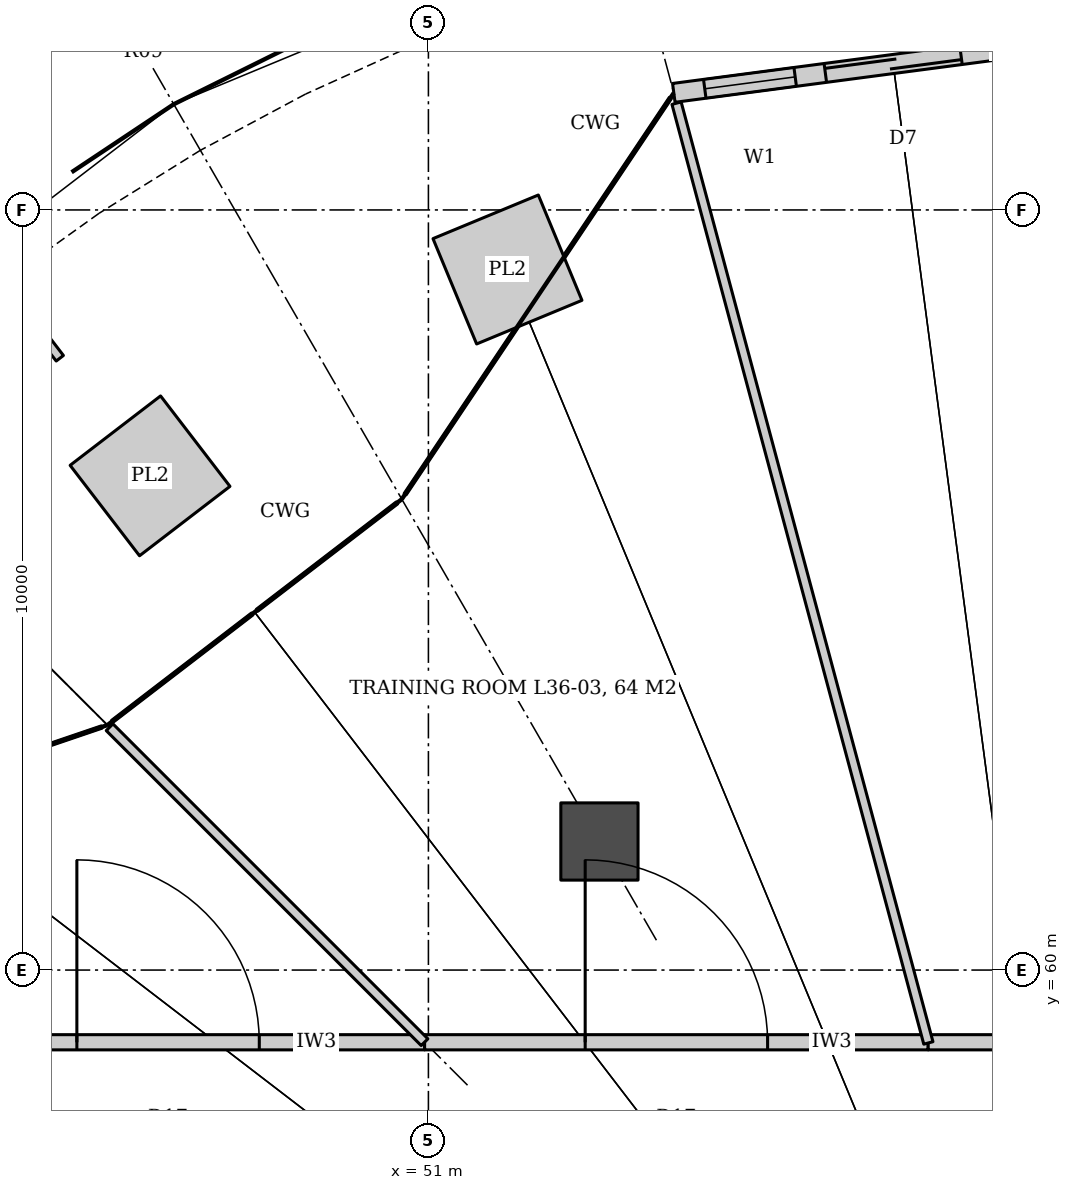
"""IFC4 building model, lengths in metres.
Left out: names, types, materials, properties, quantities, classifications, styles, units other than length and angle.
Written with IfcOpenShell. Run it as: python <this file> out.ifc"""

import sys

from ifc_helpers import new_model, si_unit, direction, frame, frame_2d, origin, origin_2d, place, context, subcontext, project, spatial, rectangle, hollow_circle, extrude, element, fill, save


model = new_model("IFC4")
c1 = context("Model", 3, precision=1e-05, world=origin(), true_north=direction((0.0, 1.0)))
c2 = subcontext(c1, "Body", "Model", "MODEL_VIEW")
j1 = project(units=[si_unit("LENGTHUNIT", "METRE"), si_unit("PLANEANGLEUNIT", "RADIAN")], contexts=[c1])
p1 = place(None, origin())
s1 = spatial("IfcSite", under=j1, at=p1, CompositionType="ELEMENT")
p2 = place(p1, origin())
s2 = spatial("IfcBuilding", under=s1, at=p2, CompositionType="ELEMENT")
p3 = place(p2, frame((0.0, 0.0, 160.4)))
s3 = spatial("IfcBuildingStorey", under=s2, at=p3, CompositionType="ELEMENT", Elevation=160.4)
p4 = place(p3, frame((53.25, 61.691, 0.0), z_axis=(0.0, 0.0, 1.0), x_axis=(1.0, 0.0, 0.0)))
e1 = element("IfcColumn", 1, at=p4, inside=s3, PredefinedType="COLUMN", context=c2, shape_type="SweptSolid", body=[
    extrude(hollow_circle(Radius=0.508, WallThickness=0.05, at=origin_2d()), origin(), (0.0, 0.0, 1.0), 4.2),
])
p5 = place(p3, frame((44.2, 59.05, 0.0), z_axis=(0.0, 0.0, 1.0), x_axis=(1.0, 0.0, 0.0)))
e2 = element("IfcWall", 2, at=p5, inside=s3, PredefinedType="PARTITIONING", context=c2, shape_type="SweptSolid", body=[
    extrude(rectangle(XDim=6.75, YDim=0.2, at=frame_2d((3.375, 0.0))), origin(), (0.0, 0.0, 1.0), 3.012),
])
p6 = place(p5, frame((2.175, 0.0, 0.0)))
e3 = element("IfcOpeningElement", 3, at=p6, cuts=e2, PredefinedType="OPENING", context=c2, shape_type="SweptSolid", body=[
    extrude(rectangle(XDim=2.4, YDim=2.4, at=frame_2d((1.2, 1.2))), frame((0.0, 0.11, 0.0), z_axis=(0.0, -1.0, 0.0), x_axis=(1.0, 0.0, 0.0)), (0.0, 0.0, 1.0), 0.22),
])
p7 = place(p3, frame((50.95, 59.05, 0.0), z_axis=(0.0, 0.0, 1.0), x_axis=(1.0, 0.0, 0.0)))
e4 = element("IfcWall", 4, at=p7, inside=s3, PredefinedType="PARTITIONING", context=c2, shape_type="SweptSolid", body=[
    extrude(rectangle(XDim=6.625, YDim=0.2, at=frame_2d((3.312, 0.0))), origin(), (0.0, 0.0, 1.0), 3.02),
])
p8 = place(p7, frame((2.113, 0.0, 0.0)))
e5 = element("IfcOpeningElement", 5, at=p8, cuts=e4, PredefinedType="OPENING", context=c2, shape_type="SweptSolid", body=[
    extrude(rectangle(XDim=2.4, YDim=2.4, at=frame_2d((1.2, 1.2))), frame((0.0, 0.11, 0.0), z_axis=(0.0, -1.0, 0.0), x_axis=(1.0, 0.0, 0.0)), (0.0, 0.0, 1.0), 0.22),
])
p9 = place(p3, frame((57.575, 59.05, 0.0), z_axis=(0.0, 0.0, 1.0), x_axis=(1.0, 0.0, 0.0)))
e6 = element("IfcWall", 6, at=p9, inside=s3, PredefinedType="PARTITIONING", context=c2, shape_type="SweptSolid", body=[
    extrude(rectangle(XDim=18.225, YDim=0.2, at=frame_2d((9.112, 0.0))), origin(), (0.0, 0.0, 1.0), 3.012),
])
p10 = place(p9, frame((8.113, 0.0, 0.0)))
e7 = element("IfcOpeningElement", 7, at=p10, cuts=e6, PredefinedType="OPENING", context=c2, shape_type="SweptSolid", body=[
    extrude(rectangle(XDim=2.0, YDim=2.1, at=frame_2d((1.0, 1.05))), frame((0.0, 0.11, 0.0), z_axis=(0.0, -1.0, 0.0), x_axis=(1.0, 0.0, 0.0)), (0.0, 0.0, 1.0), 0.22),
])
p11 = place(p3, frame((57.577, 59.041, 0.0), z_axis=(0.0, 0.0, 1.0), x_axis=(-0.258810449587, 0.96592812941, 0.0)))
e8 = element("IfcWall", 8, at=p11, inside=s3, PredefinedType="PARTITIONING", context=c2, shape_type="SweptSolid", body=[
    extrude(rectangle(XDim=12.8, YDim=0.125, at=frame_2d((6.4, 0.0))), origin(), (0.0, 0.0, 1.0), 3.012),
])
p12 = place(p3, frame((50.949, 59.051, 0.0), z_axis=(0.0, 0.0, 1.0), x_axis=(-0.707106781187, 0.707106781187, 0.0)))
e9 = element("IfcWall", 9, at=p12, inside=s3, PredefinedType="PARTITIONING", context=c2, shape_type="SweptSolid", body=[
    extrude(rectangle(XDim=5.86, YDim=0.125, at=frame_2d((2.93, 0.0))), origin(), (0.0, 0.0, 1.0), 3.012),
])
p13 = place(p3, frame((60.0, 72.3, 0.0), z_axis=(0.0, 0.0, 1.0), x_axis=(-0.99144158687, -0.130551062135, 0.0)))
e10 = element("IfcWall", 10, at=p13, inside=s3, PredefinedType="SOLIDWALL", context=c2, shape_type="SweptSolid", body=[
    extrude(rectangle(XDim=5.822, YDim=0.25, at=frame_2d((2.911, 0.0))), origin(), (0.0, 0.0, 1.0), 4.04),
])
p14 = place(p13, frame((2.011, 0.0, 0.0)))
e11 = element("IfcOpeningElement", 11, at=p14, cuts=e10, PredefinedType="OPENING", context=c2, shape_type="SweptSolid", body=[
    extrude(rectangle(XDim=1.8, YDim=2.4, at=frame_2d((0.9, 1.2))), frame((0.0, 0.135, 0.0), z_axis=(0.0, -1.0, 0.0), x_axis=(1.0, 0.0, 0.0)), (0.0, 0.0, 1.0), 0.27),
])
p15 = place(p13, frame((0.411, 0.0, 0.0)))
e12 = element("IfcOpeningElement", 12, at=p15, cuts=e10, PredefinedType="OPENING", context=c2, shape_type="SweptSolid", body=[
    extrude(rectangle(XDim=1.2, YDim=2.4, at=frame_2d((0.6, 1.2))), frame((0.0, 0.135, 0.0), z_axis=(0.0, -1.0, 0.0), x_axis=(1.0, 0.0, 0.0)), (0.0, 0.0, 1.0), 0.27),
])
p16 = place(p13, frame((4.211, 0.0, 0.0)))
e13 = element("IfcOpeningElement", 13, at=p16, cuts=e10, PredefinedType="OPENING", context=c2, shape_type="SweptSolid", body=[
    extrude(rectangle(XDim=1.2, YDim=2.4, at=frame_2d((0.6, 1.2))), frame((0.0, 0.135, 0.0), z_axis=(0.0, -1.0, 0.0), x_axis=(1.0, 0.0, 0.0)), (0.0, 0.0, 1.0), 0.27),
])
p17 = place(p8, origin())
e14 = element("IfcDoor", 14, at=p17, inside=s3, OperationType="DOUBLE_DOOR_DOUBLE_SWING", PredefinedType="DOOR", context=c2, shape_type="SweptSolid", body=[
    extrude(rectangle(XDim=2.4, YDim=2.4, at=frame_2d((1.2, 1.2))), frame((0.0, 0.025, 0.0), z_axis=(0.0, -1.0, 0.0), x_axis=(1.0, 0.0, 0.0)), (0.0, 0.0, 1.0), 0.05),
])
fill(e5, e14)
p18 = place(p6, origin())
e15 = element("IfcDoor", 15, at=p18, inside=s3, OperationType="DOUBLE_DOOR_DOUBLE_SWING", PredefinedType="DOOR", context=c2, shape_type="SweptSolid", body=[
    extrude(rectangle(XDim=2.4, YDim=2.4, at=frame_2d((1.2, 1.2))), frame((0.0, 0.025, 0.0), z_axis=(0.0, -1.0, 0.0), x_axis=(1.0, 0.0, 0.0)), (0.0, 0.0, 1.0), 0.05),
])
fill(e3, e15)
p19 = place(p14, origin())
e16 = element("IfcDoor", 16, at=p19, inside=s3, OperationType="DOUBLE_DOOR_SLIDING", PredefinedType="DOOR", context=c2, shape_type="SweptSolid", body=[
    extrude(rectangle(XDim=1.8, YDim=2.4, at=frame_2d((0.9, 1.2))), frame((0.0, 0.025, 0.0), z_axis=(0.0, -1.0, 0.0), x_axis=(1.0, 0.0, 0.0)), (0.0, 0.0, 1.0), 0.05),
])
fill(e11, e16)
p20 = place(p15, origin())
e17 = element("IfcWindow", 17, at=p20, inside=s3, PartitioningType="SINGLE_PANEL", PredefinedType="WINDOW", context=c2, shape_type="SweptSolid", body=[
    extrude(rectangle(XDim=1.2, YDim=2.4, at=frame_2d((0.6, 1.2))), frame((0.0, 0.03, 0.0), z_axis=(0.0, -1.0, 0.0), x_axis=(1.0, 0.0, 0.0)), (0.0, 0.0, 1.0), 0.06),
])
fill(e12, e17)
p21 = place(p16, origin())
e18 = element("IfcWindow", 18, at=p21, inside=s3, PartitioningType="SINGLE_PANEL", PredefinedType="WINDOW", context=c2, shape_type="SweptSolid", body=[
    extrude(rectangle(XDim=1.2, YDim=2.4, at=frame_2d((0.6, 1.2))), frame((0.0, 0.03, 0.0), z_axis=(0.0, -1.0, 0.0), x_axis=(1.0, 0.0, 0.0)), (0.0, 0.0, 1.0), 0.06),
])
fill(e13, e18)
save(model, sys.argv[1])
